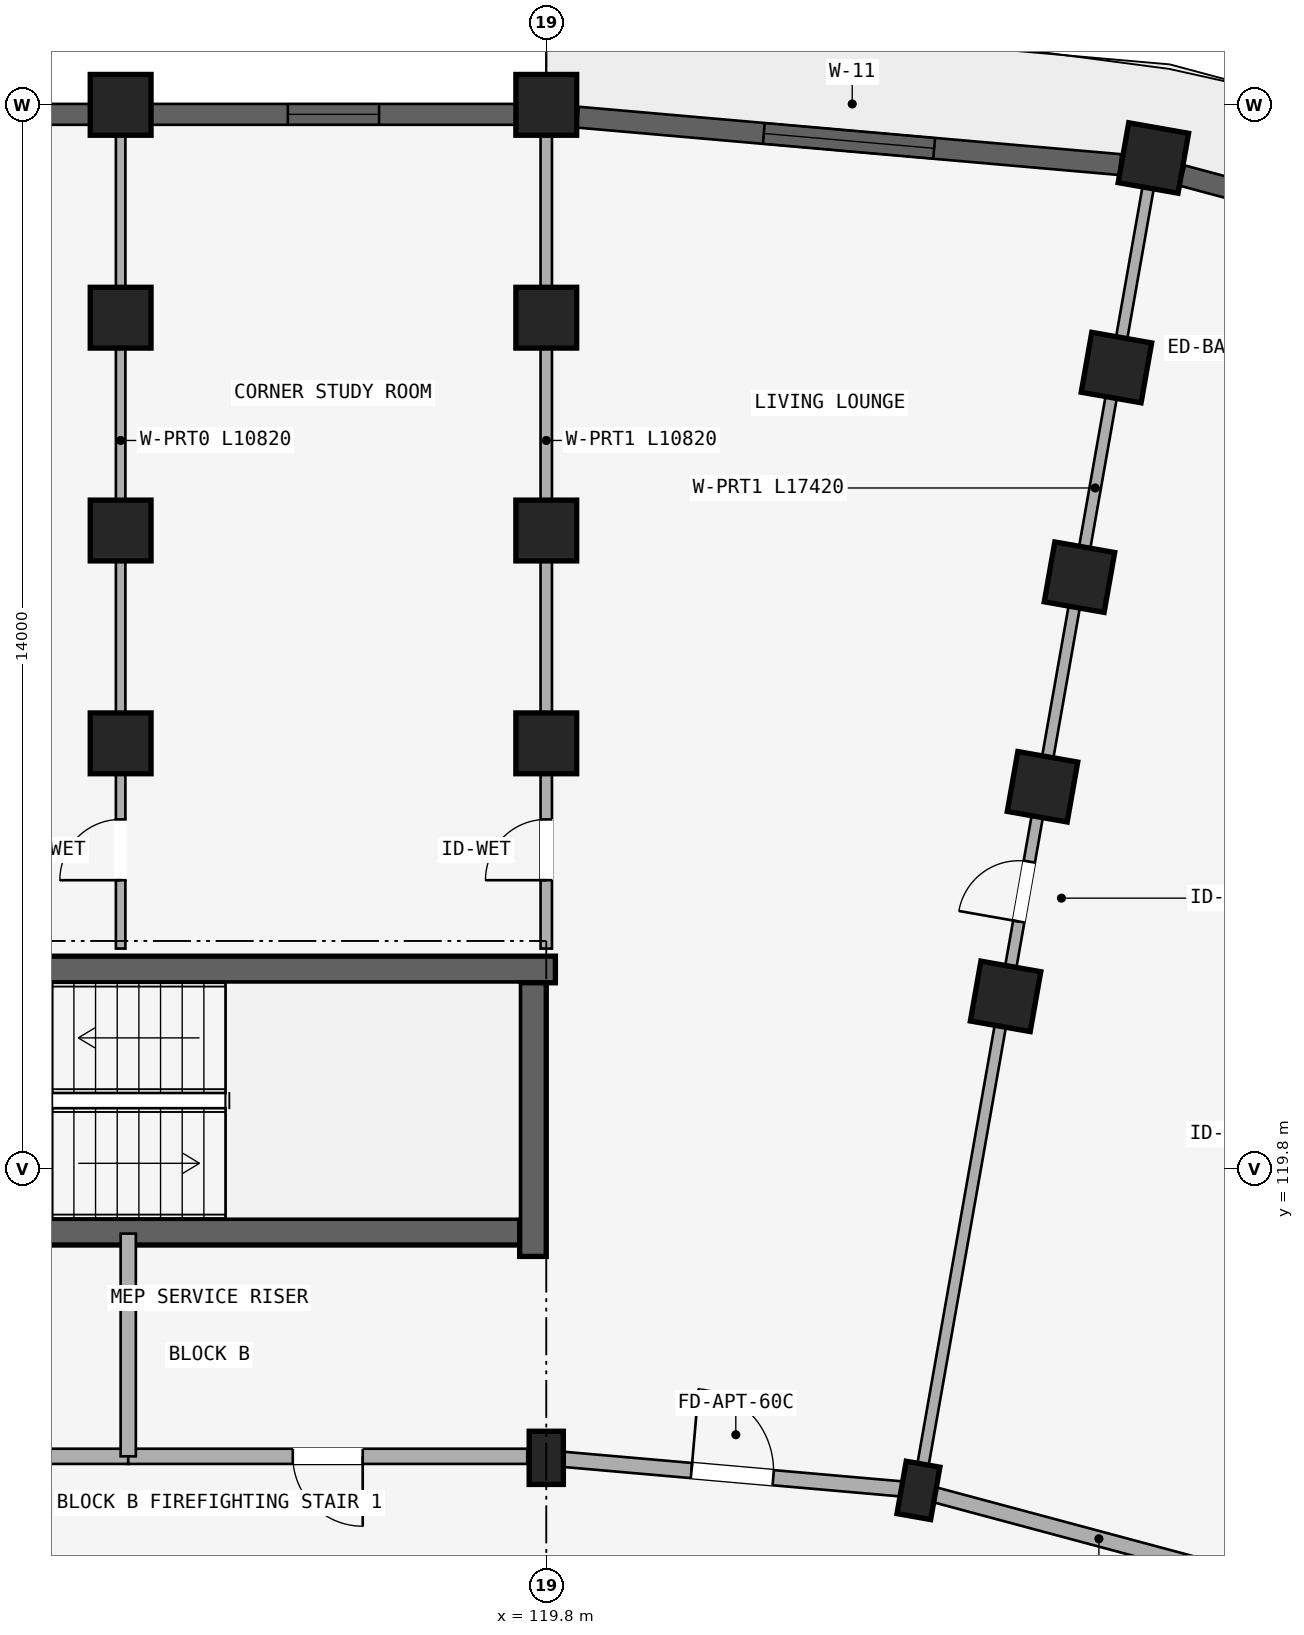
"""IFC4 building model, lengths in metres.
Left out: names, types, materials, properties, quantities, classifications, styles, units other than length and angle.
Written with IfcOpenShell. Run it as: python <this file> out.ifc"""

import sys

from ifc_helpers import new_model, si_unit, direction, frame, frame_2d, origin, origin_2d, place, context, subcontext, project, spatial, rectangle, extrude, element, fill, save


model = new_model("IFC4")
c1 = context("Model", 3, precision=1e-05, world=origin(), true_north=direction((0.0, 1.0)))
c2 = subcontext(c1, "Body", "Model", "MODEL_VIEW")
j1 = project(units=[si_unit("LENGTHUNIT", "METRE"), si_unit("PLANEANGLEUNIT", "RADIAN")], contexts=[c1])
p1 = place(None, origin())
s1 = spatial("IfcSite", under=j1, at=p1, CompositionType="ELEMENT")
p2 = place(p1, origin())
s2 = spatial("IfcBuilding", under=s1, at=p2, CompositionType="ELEMENT")
p3 = place(p2, frame((0.0, 0.0, 15.0)))
s3 = spatial("IfcBuildingStorey", under=s2, at=p3, CompositionType="ELEMENT", Elevation=15.0)
p4 = place(p3, frame((119.92, 122.425, 0.0), z_axis=(0.0, 0.0, 1.0), x_axis=(-1.0, 0.0, 0.0)))
e1 = element("IfcWall", 1, at=p4, inside=s3, PredefinedType="SHEAR", context=c2, shape_type="SweptSolid", body=[
    extrude(rectangle(XDim=8.545, YDim=0.35, at=frame_2d((4.272, 0.0))), origin(), (0.0, 0.0, 1.0), 2.93),
])
p5 = place(p3, frame((119.45, 118.975, 0.0), z_axis=(0.0, 0.0, 1.0), x_axis=(-1.0, 0.0, 0.0)))
e2 = element("IfcWall", 2, at=p5, inside=s3, PredefinedType="SHEAR", context=c2, shape_type="SweptSolid", body=[
    extrude(rectangle(XDim=8.075, YDim=0.35, at=frame_2d((4.038, 0.0))), origin(), (0.0, 0.0, 1.0), 2.93),
])
p6 = place(p5, frame((6.38, 0.0, 0.0)))
e3 = element("IfcOpeningElement", 3, at=p6, cuts=e2, PredefinedType="OPENING", context=c2, shape_type="SweptSolid", body=[
    extrude(rectangle(XDim=1.24, YDim=2.15, at=frame_2d((0.62, 1.075))), frame((0.0, 0.185, 0.0), z_axis=(0.0, -1.0, 0.0), x_axis=(1.0, 0.0, 0.0)), (0.0, 0.0, 1.0), 0.37),
])
p7 = place(p3, frame((119.625, 118.65, 0.0), z_axis=(0.0, 0.0, 1.0), x_axis=(0.0, 1.0, 0.0)))
e4 = element("IfcWall", 4, at=p7, inside=s3, PredefinedType="SHEAR", context=c2, shape_type="SweptSolid", body=[
    extrude(rectangle(XDim=3.6, YDim=0.35, at=frame_2d((1.8, 0.0))), origin(), (0.0, 0.0, 1.0), 2.93),
])
p8 = place(p3, frame((119.8, 116.0, 0.0), z_axis=(0.0, 0.0, 1.0), x_axis=(1.0, 0.0, 0.0)))
e5 = element("IfcColumn", 5, at=p8, inside=s3, PredefinedType="COLUMN", context=c2, shape_type="SweptSolid", body=[
    extrude(rectangle(XDim=0.45, YDim=0.7, at=origin_2d()), origin(), (0.0, 0.0, 1.0), 2.93),
])
for number, where, z_axis, x_axis in (
    (6, (119.8, 125.4, 0.0), (0.0, 0.0, 1.0), (1.0, 0.0, 0.0)),
    (7, (119.8, 128.2, 0.0), (0.0, 0.0, 1.0), (1.0, 0.0, 0.0)),
    (8, (119.8, 131.0, 0.0), (0.0, 0.0, 1.0), (1.0, 0.0, 0.0)),
    (9, (119.8, 133.8, 0.0), (0.0, 0.0, 1.0), (1.0, 0.0, 0.0)),
):
    element("IfcColumn", number, at=place(p3, frame(where, z_axis=z_axis, x_axis=x_axis)), inside=s3, PredefinedType="COLUMN", context=c2, shape_type="SweptSolid", body=[
        extrude(rectangle(XDim=0.8, YDim=0.8, at=origin_2d()), origin(), (0.0, 0.0, 1.0), 2.93),
    ])
p9 = place(p3, frame((124.697, 115.572, 0.0), z_axis=(0.0, 0.0, 1.0), x_axis=(-0.984807753012, 0.173648177667, 0.0)))
e10 = element("IfcColumn", 10, at=p9, inside=s3, PredefinedType="COLUMN", context=c2, shape_type="SweptSolid", body=[
    extrude(rectangle(XDim=0.45, YDim=0.7, at=origin_2d()), origin(), (0.0, 0.0, 1.0), 2.93),
])
for number, where, z_axis, x_axis in (
    (11, (125.843, 122.071, 0.0), (0.0, 0.0, 1.0), (-0.985, 0.174, 0.0)),
    (12, (126.329, 124.829, 0.0), (0.0, 0.0, 1.0), (-0.985, 0.174, 0.0)),
    (13, (126.815, 127.586, 0.0), (0.0, 0.0, 1.0), (-0.985, 0.174, 0.0)),
    (14, (127.302, 130.344, 0.0), (0.0, 0.0, 1.0), (-0.985, 0.174, 0.0)),
    (15, (127.788, 133.101, 0.0), (0.0, 0.0, 1.0), (-0.985, 0.174, 0.0)),
    (16, (114.2, 125.4, 0.0), (0.0, 0.0, 1.0), (1.0, 0.0, 0.0)),
    (17, (114.2, 128.2, 0.0), (0.0, 0.0, 1.0), (1.0, 0.0, 0.0)),
    (18, (114.2, 131.0, 0.0), (0.0, 0.0, 1.0), (1.0, 0.0, 0.0)),
    (19, (114.2, 133.8, 0.0), (0.0, 0.0, 1.0), (1.0, 0.0, 0.0)),
):
    element("IfcColumn", number, at=place(p3, frame(where, z_axis=z_axis, x_axis=x_axis)), inside=s3, PredefinedType="COLUMN", context=c2, shape_type="SweptSolid", body=[
        extrude(rectangle(XDim=0.8, YDim=0.8, at=origin_2d()), origin(), (0.0, 0.0, 1.0), 2.93),
    ])
p10 = place(p3, frame((114.3, 116.02, 0.0), z_axis=(0.0, 0.0, 1.0), x_axis=(-1.0, 0.0, 0.0)))
e20 = element("IfcWall", 20, at=p10, inside=s3, PredefinedType="STANDARD", context=c2, shape_type="SweptSolid", body=[
    extrude(rectangle(XDim=5.65, YDim=0.2, at=frame_2d((2.825, 0.0))), origin(), (0.0, 0.0, 1.0), 2.372),
])
p11 = place(p10, frame((1.923, 0.0, 0.0)))
e21 = element("IfcOpeningElement", 21, at=p11, cuts=e20, PredefinedType="OPENING", context=c2, shape_type="SweptSolid", body=[
    extrude(rectangle(XDim=1.24, YDim=2.15, at=frame_2d((0.62, 1.075))), frame((0.0, 0.11, 0.0), z_axis=(0.0, -1.0, 0.0), x_axis=(1.0, 0.0, 0.0)), (0.0, 0.0, 1.0), 0.22),
])
p12 = place(p3, frame((119.55, 116.02, 0.0), z_axis=(0.0, 0.0, 1.0), x_axis=(-1.0, 0.0, 0.0)))
e22 = element("IfcWall", 22, at=p12, inside=s3, PredefinedType="STANDARD", context=c2, shape_type="SweptSolid", body=[
    extrude(rectangle(XDim=5.25, YDim=0.2, at=frame_2d((2.625, 0.0))), origin(), (0.0, 0.0, 1.0), 2.372),
])
p13 = place(p12, frame((2.165, 0.0, 0.0)))
e23 = element("IfcOpeningElement", 23, at=p13, cuts=e22, PredefinedType="OPENING", context=c2, shape_type="SweptSolid", body=[
    extrude(rectangle(XDim=0.92, YDim=2.1, at=frame_2d((0.46, 1.05))), frame((0.0, 0.11, 0.0), z_axis=(0.0, -1.0, 0.0), x_axis=(1.0, 0.0, 0.0)), (0.0, 0.0, 1.0), 0.22),
])
p14 = place(p3, frame((114.3, 116.02, 0.0), z_axis=(0.0, 0.0, 1.0), x_axis=(0.0, 1.0, 0.0)))
e24 = element("IfcWall", 24, at=p14, inside=s3, PredefinedType="STANDARD", context=c2, shape_type="SweptSolid", body=[
    extrude(rectangle(XDim=2.93, YDim=0.2, at=frame_2d((1.465, 0.0))), origin(), (0.0, 0.0, 1.0), 2.372),
])
p15 = place(p3, frame((114.2, 122.7, 0.0), z_axis=(0.0, 0.0, 1.0), x_axis=(0.0, 1.0, 0.0)))
e25 = element("IfcWall", 25, at=p15, inside=s3, PredefinedType="PARTITIONING", context=c2, shape_type="SweptSolid", body=[
    extrude(rectangle(XDim=10.82, YDim=0.125, at=frame_2d((5.41, 0.0))), origin(), (0.0, 0.0, 1.0), 2.372),
])
p16 = place(p15, frame((0.899, 0.0, 0.0)))
e26 = element("IfcOpeningElement", 26, at=p16, cuts=e25, PredefinedType="OPENING", context=c2, shape_type="SweptSolid", body=[
    extrude(rectangle(XDim=0.8, YDim=2.1, at=frame_2d((0.4, 1.05))), frame((0.0, 0.073, 0.0), z_axis=(0.0, -1.0, 0.0), x_axis=(1.0, 0.0, 0.0)), (0.0, 0.0, 1.0), 0.145),
])
p17 = place(p3, frame((119.8, 116.0, 0.0), z_axis=(0.0, 0.0, 1.0), x_axis=(0.996193663584, -0.087167566415, 0.0)))
e27 = element("IfcWall", 27, at=p17, inside=s3, PredefinedType="STANDARD", context=c2, shape_type="SweptSolid", body=[
    extrude(rectangle(XDim=4.916, YDim=0.2, at=frame_2d((2.458, 0.0))), origin(), (0.0, 0.0, 1.0), 2.372),
])
p18 = place(p17, frame((1.918, 0.0, 0.0)))
e28 = element("IfcOpeningElement", 28, at=p18, cuts=e27, PredefinedType="OPENING", context=c2, shape_type="SweptSolid", body=[
    extrude(rectangle(XDim=1.08, YDim=2.15, at=frame_2d((0.54, 1.075))), frame((0.0, 0.11, 0.0), z_axis=(0.0, -1.0, 0.0), x_axis=(1.0, 0.0, 0.0)), (0.0, 0.0, 1.0), 0.22),
])
p19 = place(p3, frame((124.697, 115.572, 0.0), z_axis=(0.0, 0.0, 1.0), x_axis=(0.965930095386, -0.258803112091, 0.0)))
e29 = element("IfcWall", 29, at=p19, inside=s3, PredefinedType="STANDARD", context=c2, shape_type="SweptSolid", body=[
    extrude(rectangle(XDim=4.916, YDim=0.2, at=frame_2d((2.458, 0.0))), origin(), (0.0, 0.0, 1.0), 2.372),
])
p20 = place(p3, frame((119.8, 122.7, 0.0), z_axis=(0.0, 0.0, 1.0), x_axis=(0.0, 1.0, 0.0)))
e30 = element("IfcWall", 30, at=p20, inside=s3, PredefinedType="PARTITIONING", context=c2, shape_type="SweptSolid", body=[
    extrude(rectangle(XDim=10.82, YDim=0.15, at=frame_2d((5.41, 0.0))), origin(), (0.0, 0.0, 1.0), 2.372),
])
p21 = place(p20, frame((0.899, 0.0, 0.0)))
e31 = element("IfcOpeningElement", 31, at=p21, cuts=e30, PredefinedType="OPENING", context=c2, shape_type="SweptSolid", body=[
    extrude(rectangle(XDim=0.8, YDim=2.1, at=frame_2d((0.4, 1.05))), frame((0.0, 0.085, 0.0), z_axis=(0.0, -1.0, 0.0), x_axis=(1.0, 0.0, 0.0)), (0.0, 0.0, 1.0), 0.17),
])
p22 = place(p3, frame((124.714, 115.67, 0.0), z_axis=(0.0, 0.0, 1.0), x_axis=(0.173646216546, 0.984808098809, 0.0)))
e32 = element("IfcWall", 32, at=p22, inside=s3, PredefinedType="PARTITIONING", context=c2, shape_type="SweptSolid", body=[
    extrude(rectangle(XDim=17.42, YDim=0.15, at=frame_2d((8.71, 0.0))), origin(), (0.0, 0.0, 1.0), 2.372),
])
p23 = place(p22, frame((7.5, 0.0, 0.0)))
e33 = element("IfcOpeningElement", 33, at=p23, cuts=e32, PredefinedType="OPENING", context=c2, shape_type="SweptSolid", body=[
    extrude(rectangle(XDim=0.8, YDim=2.1, at=frame_2d((0.4, 1.05))), frame((0.0, 0.085, 0.0), z_axis=(0.0, -1.0, 0.0), x_axis=(1.0, 0.0, 0.0)), (0.0, 0.0, 1.0), 0.17),
])
p24 = place(p3, frame((120.215, 133.638, 0.0), z_axis=(0.0, 0.0, 1.0), x_axis=(0.99619608453, -0.08713989423, 0.0)))
e34 = element("IfcWall", 34, at=p24, inside=s3, PredefinedType="STANDARD", context=c2, shape_type="SweptSolid", body=[
    extrude(rectangle(XDim=7.164, YDim=0.275, at=frame_2d((3.582, 0.0))), origin(), (0.0, 0.0, 1.0), 2.472),
])
p25 = place(p24, frame((2.457, 0.0, 0.322)))
e35 = element("IfcOpeningElement", 35, at=p25, cuts=e34, PredefinedType="OPENING", context=c2, shape_type="SweptSolid", body=[
    extrude(rectangle(XDim=2.25, YDim=1.95, at=frame_2d((1.125, 0.975))), frame((0.0, 0.147, 0.0), z_axis=(0.0, -1.0, 0.0), x_axis=(1.0, 0.0, 0.0)), (0.0, 0.0, 1.0), 0.295),
])
p26 = place(p3, frame((128.168, 132.87, 0.0), z_axis=(0.0, 0.0, 1.0), x_axis=(0.965923712619, -0.258826933296, 0.0)))
e36 = element("IfcWall", 36, at=p26, inside=s3, PredefinedType="STANDARD", context=c2, shape_type="SweptSolid", body=[
    extrude(rectangle(XDim=7.164, YDim=0.275, at=frame_2d((3.582, 0.0))), origin(), (0.0, 0.0, 1.0), 2.472),
])
p27 = place(p26, frame((4.69, 0.0, 0.472)))
e37 = element("IfcOpeningElement", 37, at=p27, cuts=e36, PredefinedType="OPENING", context=c2, shape_type="SweptSolid", body=[
    extrude(rectangle(XDim=1.2, YDim=1.5, at=frame_2d((0.6, 0.75))), frame((0.0, 0.147, 0.0), z_axis=(0.0, -1.0, 0.0), x_axis=(1.0, 0.0, 0.0)), (0.0, 0.0, 1.0), 0.295),
])
p28 = place(p26, frame((1.907, 0.0, 0.0)))
e38 = element("IfcOpeningElement", 38, at=p28, cuts=e36, PredefinedType="OPENING", context=c2, shape_type="SweptSolid", body=[
    extrude(rectangle(XDim=1.2, YDim=2.15, at=frame_2d((0.6, 1.075))), frame((0.0, 0.147, 0.0), z_axis=(0.0, -1.0, 0.0), x_axis=(1.0, 0.0, 0.0)), (0.0, 0.0, 1.0), 0.295),
])
p29 = place(p3, frame((119.396, 133.675, 0.0), z_axis=(0.0, 0.0, 1.0), x_axis=(-1.0, 0.0, 0.0)))
e39 = element("IfcWall", 39, at=p29, inside=s3, PredefinedType="STANDARD", context=c2, shape_type="SweptSolid", body=[
    extrude(rectangle(XDim=4.793, YDim=0.275, at=frame_2d((2.396, 0.0))), origin(), (0.0, 0.0, 1.0), 2.472),
])
p30 = place(p29, frame((1.796, 0.0, 0.772)))
e40 = element("IfcOpeningElement", 40, at=p30, cuts=e39, PredefinedType="OPENING", context=c2, shape_type="SweptSolid", body=[
    extrude(rectangle(XDim=1.2, YDim=1.5, at=frame_2d((0.6, 0.75))), frame((0.0, 0.147, 0.0), z_axis=(0.0, -1.0, 0.0), x_axis=(1.0, 0.0, 0.0)), (0.0, 0.0, 1.0), 0.295),
])
p31 = place(p3, frame((113.796, 133.675, 0.0), z_axis=(0.0, 0.0, 1.0), x_axis=(-1.0, 0.0, 0.0)))
e41 = element("IfcWall", 41, at=p31, inside=s3, PredefinedType="STANDARD", context=c2, shape_type="SweptSolid", body=[
    extrude(rectangle(XDim=4.793, YDim=0.275, at=frame_2d((2.396, 0.0))), origin(), (0.0, 0.0, 1.0), 2.472),
])
p32 = place(p31, frame((1.846, 0.0, 0.822)))
e42 = element("IfcOpeningElement", 42, at=p32, cuts=e41, PredefinedType="OPENING", context=c2, shape_type="SweptSolid", body=[
    extrude(rectangle(XDim=1.1, YDim=1.45, at=frame_2d((0.55, 0.725))), frame((0.0, 0.147, 0.0), z_axis=(0.0, -1.0, 0.0), x_axis=(1.0, 0.0, 0.0)), (0.0, 0.0, 1.0), 0.295),
])
p33 = place(p25, origin())
e43 = element("IfcWindow", 43, at=p33, inside=s3, PartitioningType="TRIPLE_PANEL_VERTICAL", PredefinedType="WINDOW", context=c2, shape_type="SweptSolid", body=[
    extrude(rectangle(XDim=2.25, YDim=1.95, at=frame_2d((1.125, 0.975))), frame((0.0, 0.03, 0.0), z_axis=(0.0, -1.0, 0.0), x_axis=(1.0, 0.0, 0.0)), (0.0, 0.0, 1.0), 0.06),
])
fill(e35, e43)
p34 = place(p30, origin())
e44 = element("IfcWindow", 44, at=p34, inside=s3, PartitioningType="SINGLE_PANEL", PredefinedType="WINDOW", context=c2, shape_type="SweptSolid", body=[
    extrude(rectangle(XDim=1.2, YDim=1.5, at=frame_2d((0.6, 0.75))), frame((0.0, 0.03, 0.0), z_axis=(0.0, -1.0, 0.0), x_axis=(1.0, 0.0, 0.0)), (0.0, 0.0, 1.0), 0.06),
])
fill(e40, e44)
p35 = place(p13, frame((0.92, 0.0, 0.0), z_axis=(0.0, 0.0, 1.0), x_axis=(-1.0, 0.0, 0.0)))
e45 = element("IfcDoor", 45, at=p35, inside=s3, OperationType="SINGLE_SWING_RIGHT", PredefinedType="DOOR", context=c2, shape_type="SweptSolid", body=[
    extrude(rectangle(XDim=0.92, YDim=2.1, at=frame_2d((0.46, 1.05))), frame((0.0, 0.025, 0.0), z_axis=(0.0, -1.0, 0.0), x_axis=(1.0, 0.0, 0.0)), (0.0, 0.0, 1.0), 0.05),
])
fill(e23, e45)
p36 = place(p16, frame((0.8, 0.0, 0.0), z_axis=(0.0, 0.0, 1.0), x_axis=(-1.0, 0.0, 0.0)))
e46 = element("IfcDoor", 46, at=p36, inside=s3, OperationType="SINGLE_SWING_RIGHT", PredefinedType="DOOR", context=c2, shape_type="SweptSolid", body=[
    extrude(rectangle(XDim=0.8, YDim=2.1, at=frame_2d((0.4, 1.05))), frame((0.0, 0.025, 0.0), z_axis=(0.0, -1.0, 0.0), x_axis=(1.0, 0.0, 0.0)), (0.0, 0.0, 1.0), 0.05),
])
fill(e26, e46)
p37 = place(p21, frame((0.8, 0.0, 0.0), z_axis=(0.0, 0.0, 1.0), x_axis=(-1.0, 0.0, 0.0)))
e47 = element("IfcDoor", 47, at=p37, inside=s3, OperationType="SINGLE_SWING_RIGHT", PredefinedType="DOOR", context=c2, shape_type="SweptSolid", body=[
    extrude(rectangle(XDim=0.8, YDim=2.1, at=frame_2d((0.4, 1.05))), frame((0.0, 0.025, 0.0), z_axis=(0.0, -1.0, 0.0), x_axis=(1.0, 0.0, 0.0)), (0.0, 0.0, 1.0), 0.05),
])
fill(e31, e47)
p38 = place(p23, origin())
e48 = element("IfcDoor", 48, at=p38, inside=s3, OperationType="SINGLE_SWING_LEFT", PredefinedType="DOOR", context=c2, shape_type="SweptSolid", body=[
    extrude(rectangle(XDim=0.8, YDim=2.1, at=frame_2d((0.4, 1.05))), frame((0.0, 0.025, 0.0), z_axis=(0.0, -1.0, 0.0), x_axis=(1.0, 0.0, 0.0)), (0.0, 0.0, 1.0), 0.05),
])
fill(e33, e48)
p39 = place(p18, frame((1.08, 0.0, 0.0), z_axis=(0.0, 0.0, 1.0), x_axis=(-1.0, 0.0, 0.0)))
e49 = element("IfcDoor", 49, at=p39, inside=s3, OperationType="SINGLE_SWING_RIGHT", PredefinedType="DOOR", context=c2, shape_type="SweptSolid", body=[
    extrude(rectangle(XDim=1.08, YDim=2.15, at=frame_2d((0.54, 1.075))), frame((0.0, 0.025, 0.0), z_axis=(0.0, -1.0, 0.0), x_axis=(1.0, 0.0, 0.0)), (0.0, 0.0, 1.0), 0.05),
])
fill(e28, e49)
save(model, sys.argv[1])
